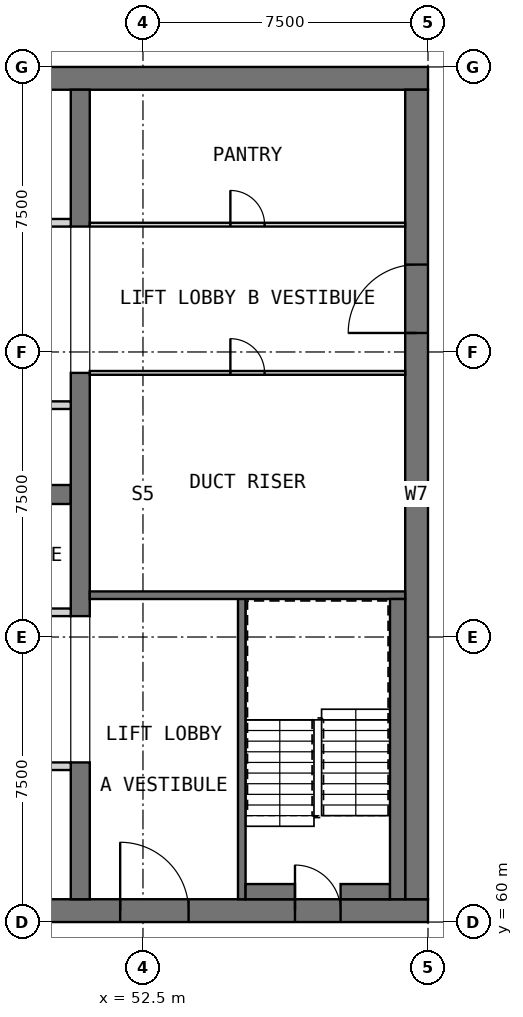
"""IFC4 building model, lengths in metres.
Left out: names, types, materials, properties, quantities, classifications, styles, units other than length and angle.
Written with IfcOpenShell. Run it as: python <this file> out.ifc"""

import sys

from ifc_helpers import new_model, si_unit, direction, frame, frame_2d, origin, place, context, subcontext, project, spatial, rectangle, extrude, element, fill, save


model = new_model("IFC4")
c1 = context("Model", 3, precision=1e-05, world=origin(), true_north=direction((0.0, 1.0)))
c2 = subcontext(c1, "Body", "Model", "MODEL_VIEW")
j1 = project(units=[si_unit("LENGTHUNIT", "METRE"), si_unit("PLANEANGLEUNIT", "RADIAN")], contexts=[c1])
p1 = place(None, origin())
s1 = spatial("IfcSite", under=j1, at=p1, CompositionType="ELEMENT")
p2 = place(p1, origin())
s2 = spatial("IfcBuilding", under=s1, at=p2, CompositionType="ELEMENT")
p3 = place(p2, frame((0.0, 0.0, 280.2)))
s3 = spatial("IfcBuildingStorey", under=s2, at=p3, CompositionType="ELEMENT", Elevation=280.2)
p4 = place(p3, frame((30.0, 60.3, 0.0), z_axis=(0.0, 0.0, 1.0), x_axis=(1.0, 0.0, 0.0)))
e1 = element("IfcWall", 1, at=p4, inside=s3, PredefinedType="SHEAR", context=c2, shape_type="SweptSolid", body=[
    extrude(rectangle(XDim=30.0, YDim=0.6, at=frame_2d((15.0, 0.0))), origin(), (0.0, 0.0, 1.0), 3.5),
])
p5 = place(p4, frame((21.9, 0.0, 0.0)))
e2 = element("IfcOpeningElement", 2, at=p5, cuts=e1, PredefinedType="OPENING", context=c2, shape_type="SweptSolid", body=[
    extrude(rectangle(XDim=1.8, YDim=2.1, at=frame_2d((0.9, 1.05))), frame((0.0, 0.31, 0.0), z_axis=(0.0, -1.0, 0.0), x_axis=(1.0, 0.0, 0.0)), (0.0, 0.0, 1.0), 0.62),
])
p6 = place(p4, frame((26.5, 0.0, 0.0)))
e3 = element("IfcOpeningElement", 3, at=p6, cuts=e1, PredefinedType="OPENING", context=c2, shape_type="SweptSolid", body=[
    extrude(rectangle(XDim=1.2, YDim=2.1, at=frame_2d((0.6, 1.05))), frame((0.0, 0.31, 0.0), z_axis=(0.0, -1.0, 0.0), x_axis=(1.0, 0.0, 0.0)), (0.0, 0.0, 1.0), 0.62),
])
p7 = place(p3, frame((30.0, 82.2, 0.0), z_axis=(0.0, 0.0, 1.0), x_axis=(1.0, 0.0, 0.0)))
e4 = element("IfcWall", 4, at=p7, inside=s3, PredefinedType="SHEAR", context=c2, shape_type="SweptSolid", body=[
    extrude(rectangle(XDim=30.0, YDim=0.6, at=frame_2d((15.0, 0.0))), origin(), (0.0, 0.0, 1.0), 3.5),
])
p8 = place(p3, frame((59.7, 60.6, 0.0), z_axis=(0.0, 0.0, 1.0), x_axis=(0.0, 1.0, 0.0)))
e5 = element("IfcWall", 5, at=p8, inside=s3, PredefinedType="SHEAR", context=c2, shape_type="SweptSolid", body=[
    extrude(rectangle(XDim=21.3, YDim=0.6, at=frame_2d((10.65, 0.0))), origin(), (0.0, 0.0, 1.0), 3.5),
])
p9 = place(p8, frame((14.9, 0.0, 0.0)))
e6 = element("IfcOpeningElement", 6, at=p9, cuts=e5, PredefinedType="OPENING", context=c2, shape_type="SweptSolid", body=[
    extrude(rectangle(XDim=1.8, YDim=2.1, at=frame_2d((0.9, 1.05))), frame((0.0, 0.31, 0.0), z_axis=(0.0, -1.0, 0.0), x_axis=(1.0, 0.0, 0.0)), (0.0, 0.0, 1.0), 0.62),
])
p10 = place(p3, frame((35.0, 71.25, 0.0), z_axis=(0.0, 0.0, 1.0), x_axis=(1.0, 0.0, 0.0)))
e7 = element("IfcWall", 7, at=p10, inside=s3, PredefinedType="SHEAR", context=c2, shape_type="SweptSolid", body=[
    extrude(rectangle(XDim=15.6, YDim=0.5, at=frame_2d((7.8, 0.0))), origin(), (0.0, 0.0, 1.0), 3.5),
])
p11 = place(p3, frame((50.85, 60.6, 0.0), z_axis=(0.0, 0.0, 1.0), x_axis=(0.0, 1.0, 0.0)))
e8 = element("IfcWall", 8, at=p11, inside=s3, PredefinedType="SHEAR", context=c2, shape_type="SweptSolid", body=[
    extrude(rectangle(XDim=3.6, YDim=0.5, at=frame_2d((1.8, 0.0))), origin(), (0.0, 0.0, 1.0), 3.5),
])
p12 = place(p3, frame((50.85, 68.05, 0.0), z_axis=(0.0, 0.0, 1.0), x_axis=(0.0, 1.0, 0.0)))
e9 = element("IfcWall", 9, at=p12, inside=s3, PredefinedType="SHEAR", context=c2, shape_type="SweptSolid", body=[
    extrude(rectangle(XDim=6.4, YDim=0.5, at=frame_2d((3.2, 0.0))), origin(), (0.0, 0.0, 1.0), 3.5),
])
p13 = place(p3, frame((50.85, 78.3, 0.0), z_axis=(0.0, 0.0, 1.0), x_axis=(0.0, 1.0, 0.0)))
e10 = element("IfcWall", 10, at=p13, inside=s3, PredefinedType="SHEAR", context=c2, shape_type="SweptSolid", body=[
    extrude(rectangle(XDim=3.6, YDim=0.5, at=frame_2d((1.8, 0.0))), origin(), (0.0, 0.0, 1.0), 3.5),
])
p14 = place(p3, frame((35.0, 64.1, 0.0), z_axis=(0.0, 0.0, 1.0), x_axis=(1.0, 0.0, 0.0)))
e11 = element("IfcWall", 11, at=p14, inside=s3, PredefinedType="PARTITIONING", context=c2, shape_type="SweptSolid", body=[
    extrude(rectangle(XDim=15.6, YDim=0.2, at=frame_2d((7.8, 0.0))), origin(), (0.0, 0.0, 1.0), 3.25),
])
p15 = place(p14, frame((2.15, 0.0, 0.0)))
e12 = element("IfcOpeningElement", 12, at=p15, cuts=e11, PredefinedType="OPENING", context=c2, shape_type="SweptSolid", body=[
    extrude(rectangle(XDim=0.9, YDim=2.1, at=frame_2d((0.45, 1.05))), frame((0.0, 0.11, 0.0), z_axis=(0.0, -1.0, 0.0), x_axis=(1.0, 0.0, 0.0)), (0.0, 0.0, 1.0), 0.22),
])
p16 = place(p14, frame((9.95, 0.0, 0.0)))
e13 = element("IfcOpeningElement", 13, at=p16, cuts=e11, PredefinedType="OPENING", context=c2, shape_type="SweptSolid", body=[
    extrude(rectangle(XDim=0.9, YDim=2.1, at=frame_2d((0.45, 1.05))), frame((0.0, 0.11, 0.0), z_axis=(0.0, -1.0, 0.0), x_axis=(1.0, 0.0, 0.0)), (0.0, 0.0, 1.0), 0.22),
])
p17 = place(p3, frame((35.0, 68.15, 0.0), z_axis=(0.0, 0.0, 1.0), x_axis=(1.0, 0.0, 0.0)))
e14 = element("IfcWall", 14, at=p17, inside=s3, PredefinedType="PARTITIONING", context=c2, shape_type="SweptSolid", body=[
    extrude(rectangle(XDim=15.6, YDim=0.2, at=frame_2d((7.8, 0.0))), origin(), (0.0, 0.0, 1.0), 3.25),
])
p18 = place(p17, frame((1.5, 0.0, 0.0)))
e15 = element("IfcOpeningElement", 15, at=p18, cuts=e14, PredefinedType="OPENING", context=c2, shape_type="SweptSolid", body=[
    extrude(rectangle(XDim=0.9, YDim=2.1, at=frame_2d((0.45, 1.05))), frame((0.0, 0.11, 0.0), z_axis=(0.0, -1.0, 0.0), x_axis=(1.0, 0.0, 0.0)), (0.0, 0.0, 1.0), 0.22),
])
p19 = place(p17, frame((7.35, 0.0, 0.0)))
e16 = element("IfcOpeningElement", 16, at=p19, cuts=e14, PredefinedType="OPENING", context=c2, shape_type="SweptSolid", body=[
    extrude(rectangle(XDim=0.9, YDim=2.1, at=frame_2d((0.45, 1.05))), frame((0.0, 0.11, 0.0), z_axis=(0.0, -1.0, 0.0), x_axis=(1.0, 0.0, 0.0)), (0.0, 0.0, 1.0), 0.22),
])
p20 = place(p17, frame((13.2, 0.0, 0.0)))
e17 = element("IfcOpeningElement", 17, at=p20, cuts=e14, PredefinedType="OPENING", context=c2, shape_type="SweptSolid", body=[
    extrude(rectangle(XDim=0.9, YDim=2.1, at=frame_2d((0.45, 1.05))), frame((0.0, 0.11, 0.0), z_axis=(0.0, -1.0, 0.0), x_axis=(1.0, 0.0, 0.0)), (0.0, 0.0, 1.0), 0.22),
])
p21 = place(p3, frame((35.0, 73.6, 0.0), z_axis=(0.0, 0.0, 1.0), x_axis=(1.0, 0.0, 0.0)))
e18 = element("IfcWall", 18, at=p21, inside=s3, PredefinedType="SOLIDWALL", context=c2, shape_type="SweptSolid", body=[
    extrude(rectangle(XDim=15.6, YDim=0.2, at=frame_2d((7.8, 0.0))), origin(), (0.0, 0.0, 1.0), 3.5),
])
p22 = place(p21, frame((0.75, 0.0, 0.0)))
e19 = element("IfcOpeningElement", 19, at=p22, cuts=e18, PredefinedType="OPENING", context=c2, shape_type="SweptSolid", body=[
    extrude(rectangle(XDim=1.1, YDim=2.1, at=frame_2d((0.55, 1.05))), frame((0.0, 0.11, 0.0), z_axis=(0.0, -1.0, 0.0), x_axis=(1.0, 0.0, 0.0)), (0.0, 0.0, 1.0), 0.22),
])
p23 = place(p21, frame((3.35, 0.0, 0.0)))
e20 = element("IfcOpeningElement", 20, at=p23, cuts=e18, PredefinedType="OPENING", context=c2, shape_type="SweptSolid", body=[
    extrude(rectangle(XDim=1.1, YDim=2.1, at=frame_2d((0.55, 1.05))), frame((0.0, 0.11, 0.0), z_axis=(0.0, -1.0, 0.0), x_axis=(1.0, 0.0, 0.0)), (0.0, 0.0, 1.0), 0.22),
])
p24 = place(p21, frame((5.95, 0.0, 0.0)))
e21 = element("IfcOpeningElement", 21, at=p24, cuts=e18, PredefinedType="OPENING", context=c2, shape_type="SweptSolid", body=[
    extrude(rectangle(XDim=1.1, YDim=2.1, at=frame_2d((0.55, 1.05))), frame((0.0, 0.11, 0.0), z_axis=(0.0, -1.0, 0.0), x_axis=(1.0, 0.0, 0.0)), (0.0, 0.0, 1.0), 0.22),
])
p25 = place(p21, frame((8.55, 0.0, 0.0)))
e22 = element("IfcOpeningElement", 22, at=p25, cuts=e18, PredefinedType="OPENING", context=c2, shape_type="SweptSolid", body=[
    extrude(rectangle(XDim=1.1, YDim=2.1, at=frame_2d((0.55, 1.05))), frame((0.0, 0.11, 0.0), z_axis=(0.0, -1.0, 0.0), x_axis=(1.0, 0.0, 0.0)), (0.0, 0.0, 1.0), 0.22),
])
p26 = place(p21, frame((11.15, 0.0, 0.0)))
e23 = element("IfcOpeningElement", 23, at=p26, cuts=e18, PredefinedType="OPENING", context=c2, shape_type="SweptSolid", body=[
    extrude(rectangle(XDim=1.1, YDim=2.1, at=frame_2d((0.55, 1.05))), frame((0.0, 0.11, 0.0), z_axis=(0.0, -1.0, 0.0), x_axis=(1.0, 0.0, 0.0)), (0.0, 0.0, 1.0), 0.22),
])
p27 = place(p21, frame((13.75, 0.0, 0.0)))
e24 = element("IfcOpeningElement", 24, at=p27, cuts=e18, PredefinedType="OPENING", context=c2, shape_type="SweptSolid", body=[
    extrude(rectangle(XDim=1.1, YDim=2.1, at=frame_2d((0.55, 1.05))), frame((0.0, 0.11, 0.0), z_axis=(0.0, -1.0, 0.0), x_axis=(1.0, 0.0, 0.0)), (0.0, 0.0, 1.0), 0.22),
])
p28 = place(p3, frame((35.0, 78.4, 0.0), z_axis=(0.0, 0.0, 1.0), x_axis=(1.0, 0.0, 0.0)))
e25 = element("IfcWall", 25, at=p28, inside=s3, PredefinedType="SOLIDWALL", context=c2, shape_type="SweptSolid", body=[
    extrude(rectangle(XDim=15.6, YDim=0.2, at=frame_2d((7.8, 0.0))), origin(), (0.0, 0.0, 1.0), 3.5),
])
p29 = place(p28, frame((0.75, 0.0, 0.0)))
e26 = element("IfcOpeningElement", 26, at=p29, cuts=e25, PredefinedType="OPENING", context=c2, shape_type="SweptSolid", body=[
    extrude(rectangle(XDim=1.1, YDim=2.1, at=frame_2d((0.55, 1.05))), frame((0.0, 0.11, 0.0), z_axis=(0.0, -1.0, 0.0), x_axis=(1.0, 0.0, 0.0)), (0.0, 0.0, 1.0), 0.22),
])
p30 = place(p28, frame((3.35, 0.0, 0.0)))
e27 = element("IfcOpeningElement", 27, at=p30, cuts=e25, PredefinedType="OPENING", context=c2, shape_type="SweptSolid", body=[
    extrude(rectangle(XDim=1.1, YDim=2.1, at=frame_2d((0.55, 1.05))), frame((0.0, 0.11, 0.0), z_axis=(0.0, -1.0, 0.0), x_axis=(1.0, 0.0, 0.0)), (0.0, 0.0, 1.0), 0.22),
])
p31 = place(p28, frame((11.15, 0.0, 0.0)))
e28 = element("IfcOpeningElement", 28, at=p31, cuts=e25, PredefinedType="OPENING", context=c2, shape_type="SweptSolid", body=[
    extrude(rectangle(XDim=1.1, YDim=2.1, at=frame_2d((0.55, 1.05))), frame((0.0, 0.11, 0.0), z_axis=(0.0, -1.0, 0.0), x_axis=(1.0, 0.0, 0.0)), (0.0, 0.0, 1.0), 0.22),
])
p32 = place(p28, frame((13.75, 0.0, 0.0)))
e29 = element("IfcOpeningElement", 29, at=p32, cuts=e25, PredefinedType="OPENING", context=c2, shape_type="SweptSolid", body=[
    extrude(rectangle(XDim=1.1, YDim=2.1, at=frame_2d((0.55, 1.05))), frame((0.0, 0.11, 0.0), z_axis=(0.0, -1.0, 0.0), x_axis=(1.0, 0.0, 0.0)), (0.0, 0.0, 1.0), 0.22),
])
p33 = place(p3, frame((55.1, 60.6, 0.0), z_axis=(0.0, 0.0, 1.0), x_axis=(0.0, 1.0, 0.0)))
e30 = element("IfcWall", 30, at=p33, inside=s3, PredefinedType="SOLIDWALL", context=c2, shape_type="SweptSolid", body=[
    extrude(rectangle(XDim=8.0, YDim=0.2, at=frame_2d((4.0, 0.0))), origin(), (0.0, 0.0, 1.0), 3.25),
])
p34 = place(p3, frame((51.1, 68.6, 0.0), z_axis=(0.0, 0.0, 1.0), x_axis=(1.0, 0.0, 0.0)))
e31 = element("IfcWall", 31, at=p34, inside=s3, PredefinedType="SOLIDWALL", context=c2, shape_type="SweptSolid", body=[
    extrude(rectangle(XDim=8.3, YDim=0.2, at=frame_2d((4.15, 0.0))), origin(), (0.0, 0.0, 1.0), 3.25),
])
for number, where, z_axis, x_axis in (
    (32, (55.2, 60.8, 0.0), (0.0, 0.0, 1.0), (1.0, 0.0, 0.0)),
    (33, (57.7, 60.8, 0.0), (0.0, 0.0, 1.0), (1.0, 0.0, 0.0)),
):
    element("IfcWall", number, at=place(p3, frame(where, z_axis=z_axis, x_axis=x_axis)), inside=s3, PredefinedType="SOLIDWALL", context=c2, shape_type="SweptSolid", body=[
        extrude(rectangle(XDim=1.3, YDim=0.4, at=frame_2d((0.65, 0.0))), origin(), (0.0, 0.0, 1.0), 3.25),
    ])
p35 = place(p3, frame((59.2, 60.6, 0.0), z_axis=(0.0, 0.0, 1.0), x_axis=(0.0, 1.0, 0.0)))
e34 = element("IfcWall", 34, at=p35, inside=s3, PredefinedType="SOLIDWALL", context=c2, shape_type="SweptSolid", body=[
    extrude(rectangle(XDim=7.9, YDim=0.4, at=frame_2d((3.95, 0.0))), origin(), (0.0, 0.0, 1.0), 3.25),
])
p36 = place(p3, frame((51.1, 74.45, 0.0), z_axis=(0.0, 0.0, 1.0), x_axis=(1.0, 0.0, 0.0)))
e35 = element("IfcWall", 35, at=p36, inside=s3, PredefinedType="PARTITIONING", context=c2, shape_type="SweptSolid", body=[
    extrude(rectangle(XDim=8.3, YDim=0.1, at=frame_2d((4.15, 0.0))), origin(), (0.0, 0.0, 1.0), 3.25),
])
p37 = place(p36, frame((3.7, 0.0, 0.0)))
e36 = element("IfcOpeningElement", 36, at=p37, cuts=e35, PredefinedType="OPENING", context=c2, shape_type="SweptSolid", body=[
    extrude(rectangle(XDim=0.9, YDim=2.1, at=frame_2d((0.45, 1.05))), frame((0.0, 0.06, 0.0), z_axis=(0.0, -1.0, 0.0), x_axis=(1.0, 0.0, 0.0)), (0.0, 0.0, 1.0), 0.12),
])
p38 = place(p3, frame((51.1, 78.35, 0.0), z_axis=(0.0, 0.0, 1.0), x_axis=(1.0, 0.0, 0.0)))
e37 = element("IfcWall", 37, at=p38, inside=s3, PredefinedType="PARTITIONING", context=c2, shape_type="SweptSolid", body=[
    extrude(rectangle(XDim=8.3, YDim=0.1, at=frame_2d((4.15, 0.0))), origin(), (0.0, 0.0, 1.0), 3.25),
])
p39 = place(p38, frame((3.7, 0.0, 0.0)))
e38 = element("IfcOpeningElement", 38, at=p39, cuts=e37, PredefinedType="OPENING", context=c2, shape_type="SweptSolid", body=[
    extrude(rectangle(XDim=0.9, YDim=2.1, at=frame_2d((0.45, 1.05))), frame((0.0, 0.06, 0.0), z_axis=(0.0, -1.0, 0.0), x_axis=(1.0, 0.0, 0.0)), (0.0, 0.0, 1.0), 0.12),
])
p40 = place(p5, origin())
e39 = element("IfcDoor", 39, at=p40, inside=s3, OperationType="DOUBLE_DOOR_SINGLE_SWING", PredefinedType="DOOR", context=c2, shape_type="SweptSolid", body=[
    extrude(rectangle(XDim=1.8, YDim=2.1, at=frame_2d((0.9, 1.05))), frame((0.0, 0.025, 0.0), z_axis=(0.0, -1.0, 0.0), x_axis=(1.0, 0.0, 0.0)), (0.0, 0.0, 1.0), 0.05),
])
fill(e2, e39)
p41 = place(p9, origin())
e40 = element("IfcDoor", 40, at=p41, inside=s3, OperationType="DOUBLE_DOOR_SINGLE_SWING", PredefinedType="DOOR", context=c2, shape_type="SweptSolid", body=[
    extrude(rectangle(XDim=1.8, YDim=2.1, at=frame_2d((0.9, 1.05))), frame((0.0, 0.025, 0.0), z_axis=(0.0, -1.0, 0.0), x_axis=(1.0, 0.0, 0.0)), (0.0, 0.0, 1.0), 0.05),
])
fill(e6, e40)
p42 = place(p6, origin())
e41 = element("IfcDoor", 41, at=p42, inside=s3, OperationType="SINGLE_SWING_LEFT", PredefinedType="DOOR", context=c2, shape_type="SweptSolid", body=[
    extrude(rectangle(XDim=1.2, YDim=2.1, at=frame_2d((0.6, 1.05))), frame((0.0, 0.025, 0.0), z_axis=(0.0, -1.0, 0.0), x_axis=(1.0, 0.0, 0.0)), (0.0, 0.0, 1.0), 0.05),
])
fill(e3, e41)
p43 = place(p37, origin())
e42 = element("IfcDoor", 42, at=p43, inside=s3, OperationType="SINGLE_SWING_RIGHT", PredefinedType="DOOR", context=c2, shape_type="SweptSolid", body=[
    extrude(rectangle(XDim=0.9, YDim=2.1, at=frame_2d((0.45, 1.05))), frame((0.0, 0.025, 0.0), z_axis=(0.0, -1.0, 0.0), x_axis=(1.0, 0.0, 0.0)), (0.0, 0.0, 1.0), 0.05),
])
fill(e36, e42)
p44 = place(p39, origin())
e43 = element("IfcDoor", 43, at=p44, inside=s3, OperationType="SINGLE_SWING_RIGHT", PredefinedType="DOOR", context=c2, shape_type="SweptSolid", body=[
    extrude(rectangle(XDim=0.9, YDim=2.1, at=frame_2d((0.45, 1.05))), frame((0.0, 0.025, 0.0), z_axis=(0.0, -1.0, 0.0), x_axis=(1.0, 0.0, 0.0)), (0.0, 0.0, 1.0), 0.05),
])
fill(e38, e43)
save(model, sys.argv[1])
